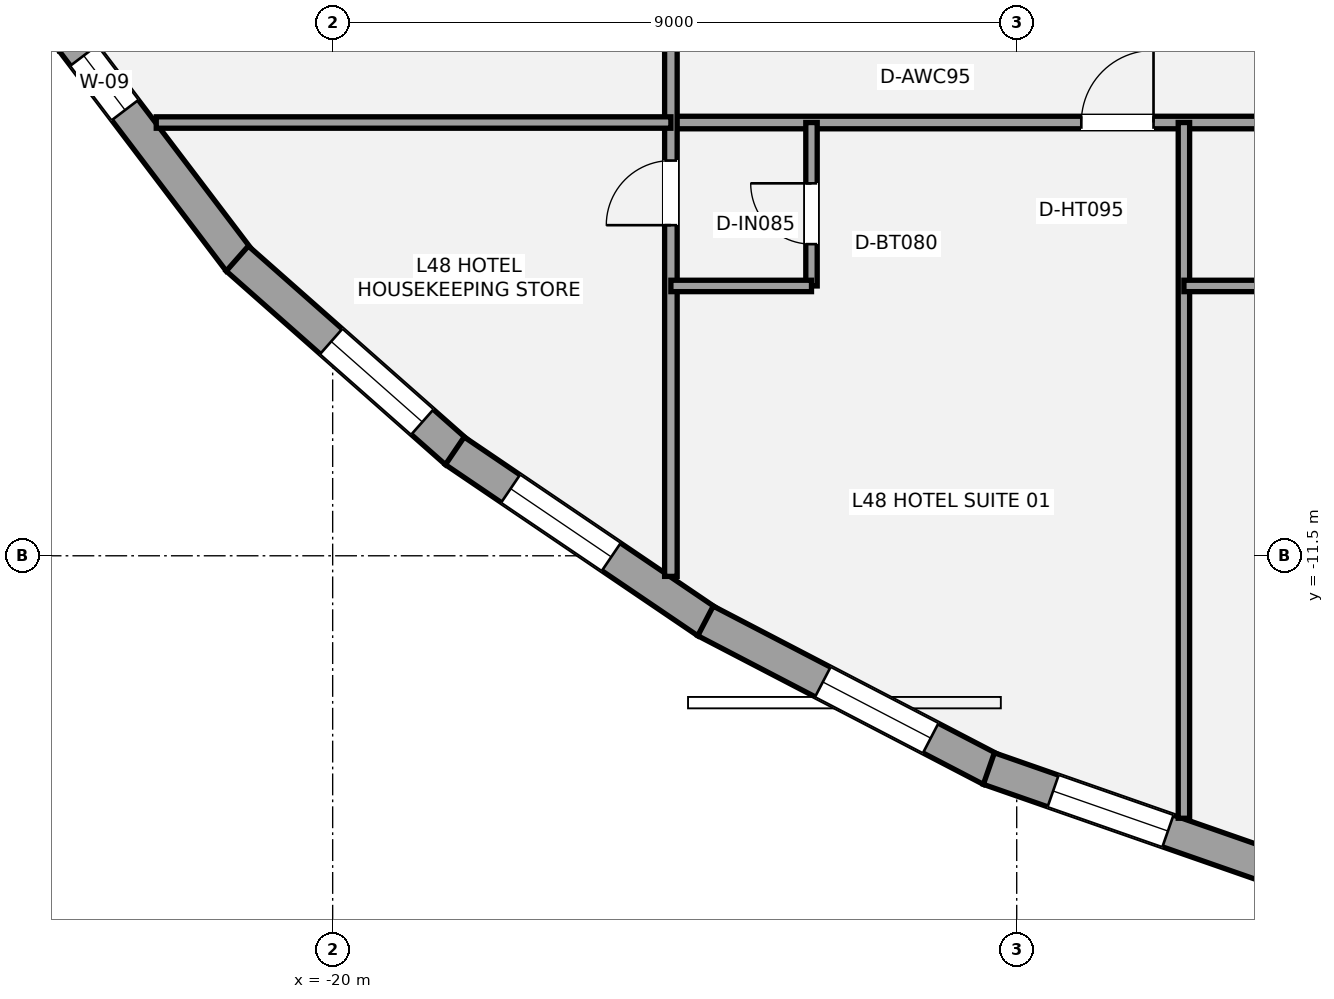
"""IFC4 building model, lengths in metres.
Left out: names, types, materials, properties, quantities, classifications, styles, units other than length and angle.
Written with IfcOpenShell. Run it as: python <this file> out.ifc"""

import sys

from ifc_helpers import new_model, si_unit, direction, frame, frame_2d, origin, place, context, subcontext, project, spatial, rectangle, extrude, element, fill, save


model = new_model("IFC4")
c1 = context("Model", 3, precision=1e-05, world=origin(), true_north=direction((0.0, 1.0)))
c2 = subcontext(c1, "Body", "Model", "MODEL_VIEW")
j1 = project(units=[si_unit("LENGTHUNIT", "METRE"), si_unit("PLANEANGLEUNIT", "RADIAN")], contexts=[c1])
p1 = place(None, origin())
s1 = spatial("IfcSite", under=j1, at=p1, CompositionType="ELEMENT")
p2 = place(p1, origin())
s2 = spatial("IfcBuilding", under=s1, at=p2, CompositionType="ELEMENT")
p3 = place(p2, frame((0.0, 0.0, 175.8)))
s3 = spatial("IfcBuildingStorey", under=s2, at=p3, CompositionType="ELEMENT", Elevation=175.8)
p4 = place(p3, frame((-21.225, -7.621, 0.0), z_axis=(0.0, 0.0, 1.0), x_axis=(-0.604517065871, 0.796592189939, 0.0)))
e1 = element("IfcWall", 1, at=p4, inside=s3, PredefinedType="STANDARD", context=c2, shape_type="SweptSolid", body=[
    extrude(rectangle(XDim=3.642, YDim=0.44, at=frame_2d((1.821, 0.0))), origin(), (0.0, 0.0, 1.0), 2.315),
])
p5 = place(p4, frame((2.492, 0.0, 0.58)))
e2 = element("IfcOpeningElement", 2, at=p5, cuts=e1, PredefinedType="OPENING", context=c2, shape_type="SweptSolid", body=[
    extrude(rectangle(XDim=0.9, YDim=1.35, at=frame_2d((0.45, 0.675))), frame((0.0, 0.23, 0.0), z_axis=(0.0, -1.0, 0.0), x_axis=(1.0, 0.0, 0.0)), (0.0, 0.0, 1.0), 0.46),
])
p6 = place(p3, frame((-18.371, -10.136, 0.0), z_axis=(0.0, 0.0, 1.0), x_axis=(-0.749530401757, 0.661969921403, 0.0)))
e3 = element("IfcWall", 3, at=p6, inside=s3, PredefinedType="STANDARD", context=c2, shape_type="SweptSolid", body=[
    extrude(rectangle(XDim=3.848, YDim=0.44, at=frame_2d((1.924, 0.0))), origin(), (0.0, 0.0, 1.0), 2.315),
])
p7 = place(p6, frame((0.6, 0.0, 0.58)))
e4 = element("IfcOpeningElement", 4, at=p7, cuts=e3, PredefinedType="OPENING", context=c2, shape_type="SweptSolid", body=[
    extrude(rectangle(XDim=1.6, YDim=1.55, at=frame_2d((0.8, 0.775))), frame((0.0, 0.23, 0.0), z_axis=(0.0, -1.0, 0.0), x_axis=(1.0, 0.0, 0.0)), (0.0, 0.0, 1.0), 0.46),
])
p8 = place(p3, frame((-15.073, -12.37, 0.0), z_axis=(0.0, 0.0, 1.0), x_axis=(-0.827746348969, 0.561102469937, 0.0)))
e5 = element("IfcWall", 5, at=p8, inside=s3, PredefinedType="STANDARD", context=c2, shape_type="SweptSolid", body=[
    extrude(rectangle(XDim=4.011, YDim=0.44, at=frame_2d((2.006, 0.0))), origin(), (0.0, 0.0, 1.0), 2.315),
])
p9 = place(p8, frame((1.524, 0.0, 0.58)))
e6 = element("IfcOpeningElement", 6, at=p9, cuts=e5, PredefinedType="OPENING", context=c2, shape_type="SweptSolid", body=[
    extrude(rectangle(XDim=1.6, YDim=1.55, at=frame_2d((0.8, 0.775))), frame((0.0, 0.23, 0.0), z_axis=(0.0, -1.0, 0.0), x_axis=(1.0, 0.0, 0.0)), (0.0, 0.0, 1.0), 0.46),
])
p10 = place(p3, frame((-11.337, -14.312, 0.0), z_axis=(0.0, 0.0, 1.0), x_axis=(-0.887117685078, 0.461543294634, 0.0)))
e7 = element("IfcWall", 7, at=p10, inside=s3, PredefinedType="STANDARD", context=c2, shape_type="SweptSolid", body=[
    extrude(rectangle(XDim=4.235, YDim=0.44, at=frame_2d((2.118, 0.0))), origin(), (0.0, 0.0, 1.0), 2.315),
])
p11 = place(p10, frame((0.896, 0.0, 0.58)))
e8 = element("IfcOpeningElement", 8, at=p11, cuts=e7, PredefinedType="OPENING", context=c2, shape_type="SweptSolid", body=[
    extrude(rectangle(XDim=1.6, YDim=1.55, at=frame_2d((0.8, 0.775))), frame((0.0, 0.23, 0.0), z_axis=(0.0, -1.0, 0.0), x_axis=(1.0, 0.0, 0.0)), (0.0, 0.0, 1.0), 0.46),
])
p12 = place(p3, frame((-7.087, -15.792, 0.0), z_axis=(0.0, 0.0, 1.0), x_axis=(-0.944223944927, 0.329304026434, 0.0)))
e9 = element("IfcWall", 9, at=p12, inside=s3, PredefinedType="STANDARD", context=c2, shape_type="SweptSolid", body=[
    extrude(rectangle(XDim=4.532, YDim=0.44, at=frame_2d((2.266, 0.0))), origin(), (0.0, 0.0, 1.0), 2.315),
])
p13 = place(p12, frame((2.037, 0.0, 0.58)))
e10 = element("IfcOpeningElement", 10, at=p13, cuts=e9, PredefinedType="OPENING", context=c2, shape_type="SweptSolid", body=[
    extrude(rectangle(XDim=1.6, YDim=1.55, at=frame_2d((0.8, 0.775))), frame((0.0, 0.23, 0.0), z_axis=(0.0, -1.0, 0.0), x_axis=(1.0, 0.0, 0.0)), (0.0, 0.0, 1.0), 0.46),
])
p14 = place(p3, frame((-15.55, -5.8, 0.0), z_axis=(0.0, 0.0, 1.0), x_axis=(1.0, 0.0, 0.0)))
e11 = element("IfcWall", 11, at=p14, inside=s3, PredefinedType="PARTITIONING", context=c2, shape_type="SweptSolid", body=[
    extrude(rectangle(XDim=31.1, YDim=0.165, at=frame_2d((15.55, 0.0))), origin(), (0.0, 0.0, 1.0), 2.398),
])
p15 = place(p14, frame((5.4, 0.0, 0.0)))
e12 = element("IfcOpeningElement", 12, at=p15, cuts=e11, PredefinedType="OPENING", context=c2, shape_type="SweptSolid", body=[
    extrude(rectangle(XDim=0.95, YDim=2.15, at=frame_2d((0.475, 1.075))), frame((0.0, 0.093, 0.0), z_axis=(0.0, -1.0, 0.0), x_axis=(1.0, 0.0, 0.0)), (0.0, 0.0, 1.0), 0.185),
])
p16 = place(p14, frame((13.2, 0.0, 0.0)))
e13 = element("IfcOpeningElement", 13, at=p16, cuts=e11, PredefinedType="OPENING", context=c2, shape_type="SweptSolid", body=[
    extrude(rectangle(XDim=0.95, YDim=2.15, at=frame_2d((0.475, 1.075))), frame((0.0, 0.093, 0.0), z_axis=(0.0, -1.0, 0.0), x_axis=(1.0, 0.0, 0.0)), (0.0, 0.0, 1.0), 0.185),
])
p17 = place(p14, frame((21.0, 0.0, 0.0)))
e14 = element("IfcOpeningElement", 14, at=p17, cuts=e11, PredefinedType="OPENING", context=c2, shape_type="SweptSolid", body=[
    extrude(rectangle(XDim=0.95, YDim=2.15, at=frame_2d((0.475, 1.075))), frame((0.0, 0.093, 0.0), z_axis=(0.0, -1.0, 0.0), x_axis=(1.0, 0.0, 0.0)), (0.0, 0.0, 1.0), 0.185),
])
p18 = place(p14, frame((29.75, 0.0, 0.0)))
e15 = element("IfcOpeningElement", 15, at=p18, cuts=e11, PredefinedType="OPENING", context=c2, shape_type="SweptSolid", body=[
    extrude(rectangle(XDim=0.95, YDim=2.15, at=frame_2d((0.475, 1.075))), frame((0.0, 0.093, 0.0), z_axis=(0.0, -1.0, 0.0), x_axis=(1.0, 0.0, 0.0)), (0.0, 0.0, 1.0), 0.185),
])
p19 = place(p3, frame((-15.55, -11.771, 0.0), z_axis=(0.0, 0.0, 1.0), x_axis=(0.0, 1.0, 0.0)))
e16 = element("IfcWall", 16, at=p19, inside=s3, PredefinedType="PARTITIONING", context=c2, shape_type="SweptSolid", body=[
    extrude(rectangle(XDim=19.321, YDim=0.165, at=frame_2d((9.661, 0.0))), origin(), (0.0, 0.0, 1.0), 2.473),
])
p20 = place(p19, frame((4.621, 0.0, 0.0)))
e17 = element("IfcOpeningElement", 17, at=p20, cuts=e16, PredefinedType="OPENING", context=c2, shape_type="SweptSolid", body=[
    extrude(rectangle(XDim=0.85, YDim=2.1, at=frame_2d((0.425, 1.05))), frame((0.0, 0.093, 0.0), z_axis=(0.0, -1.0, 0.0), x_axis=(1.0, 0.0, 0.0)), (0.0, 0.0, 1.0), 0.185),
])
p21 = place(p19, frame((7.771, 0.0, 0.0)))
e18 = element("IfcOpeningElement", 18, at=p21, cuts=e16, PredefinedType="OPENING", context=c2, shape_type="SweptSolid", body=[
    extrude(rectangle(XDim=1.0, YDim=2.15, at=frame_2d((0.5, 1.075))), frame((0.0, 0.093, 0.0), z_axis=(0.0, -1.0, 0.0), x_axis=(1.0, 0.0, 0.0)), (0.0, 0.0, 1.0), 0.185),
])
p22 = place(p19, frame((12.172, 0.0, 0.0)))
e19 = element("IfcOpeningElement", 19, at=p22, cuts=e16, PredefinedType="OPENING", context=c2, shape_type="SweptSolid", body=[
    extrude(rectangle(XDim=1.0, YDim=2.15, at=frame_2d((0.5, 1.075))), frame((0.0, 0.093, 0.0), z_axis=(0.0, -1.0, 0.0), x_axis=(1.0, 0.0, 0.0)), (0.0, 0.0, 1.0), 0.185),
])
p23 = place(p19, frame((16.547, 0.0, 0.0)))
e20 = element("IfcOpeningElement", 20, at=p23, cuts=e16, PredefinedType="OPENING", context=c2, shape_type="SweptSolid", body=[
    extrude(rectangle(XDim=1.0, YDim=2.15, at=frame_2d((0.5, 1.075))), frame((0.0, 0.093, 0.0), z_axis=(0.0, -1.0, 0.0), x_axis=(1.0, 0.0, 0.0)), (0.0, 0.0, 1.0), 0.185),
])
p24 = place(p3, frame((-22.321, -5.8, 0.0), z_axis=(0.0, 0.0, 1.0), x_axis=(1.0, 0.0, 0.0)))
e21 = element("IfcWall", 21, at=p24, inside=s3, PredefinedType="PLUMBINGWALL", context=c2, shape_type="SweptSolid", body=[
    extrude(rectangle(XDim=6.771, YDim=0.15, at=frame_2d((3.385, 0.0))), origin(), (0.0, 0.0, 1.0), 2.473),
])
p25 = place(p3, frame((-8.8, -14.953, 0.0), z_axis=(0.0, 0.0, 1.0), x_axis=(0.0, 1.0, 0.0)))
e22 = element("IfcWall", 22, at=p25, inside=s3, PredefinedType="PLUMBINGWALL", context=c2, shape_type="SweptSolid", body=[
    extrude(rectangle(XDim=9.153, YDim=0.15, at=frame_2d((4.577, 0.0))), origin(), (0.0, 0.0, 1.0), 3.02),
])
p26 = place(p3, frame((-13.7, -7.95, 0.0), z_axis=(0.0, 0.0, 1.0), x_axis=(0.0, 1.0, 0.0)))
e23 = element("IfcWall", 23, at=p26, inside=s3, PredefinedType="PLUMBINGWALL", context=c2, shape_type="SweptSolid", body=[
    extrude(rectangle(XDim=2.15, YDim=0.15, at=frame_2d((1.075, 0.0))), origin(), (0.0, 0.0, 1.0), 2.473),
])
p27 = place(p26, frame((0.55, 0.0, 0.0)))
e24 = element("IfcOpeningElement", 24, at=p27, cuts=e23, PredefinedType="OPENING", context=c2, shape_type="SweptSolid", body=[
    extrude(rectangle(XDim=0.8, YDim=2.1, at=frame_2d((0.4, 1.05))), frame((0.0, 0.085, 0.0), z_axis=(0.0, -1.0, 0.0), x_axis=(1.0, 0.0, 0.0)), (0.0, 0.0, 1.0), 0.17),
])
for number, where, z_axis, x_axis in (
    (25, (-15.55, -7.95, 0.0), (0.0, 0.0, 1.0), (1.0, 0.0, 0.0)),
    (26, (-8.8, -7.95, 0.0), (0.0, 0.0, 1.0), (1.0, 0.0, 0.0)),
):
    element("IfcWall", number, at=place(p3, frame(where, z_axis=z_axis, x_axis=x_axis)), inside=s3, PredefinedType="PLUMBINGWALL", context=c2, shape_type="SweptSolid", body=[
        extrude(rectangle(XDim=1.85, YDim=0.15, at=frame_2d((0.925, 0.0))), origin(), (0.0, 0.0, 1.0), 2.473),
    ])
p28 = place(p5, origin())
e27 = element("IfcWindow", 27, at=p28, inside=s3, PartitioningType="SINGLE_PANEL", PredefinedType="WINDOW", context=c2, shape_type="SweptSolid", body=[
    extrude(rectangle(XDim=0.9, YDim=1.35, at=frame_2d((0.45, 0.675))), frame((0.0, -0.01, 0.0), z_axis=(0.0, -1.0, 0.0), x_axis=(1.0, 0.0, 0.0)), (0.0, 0.0, 1.0), 0.06),
])
fill(e2, e27)
p29 = place(p7, origin())
e28 = element("IfcWindow", 28, at=p29, inside=s3, PartitioningType="SINGLE_PANEL", PredefinedType="WINDOW", context=c2, shape_type="SweptSolid", body=[
    extrude(rectangle(XDim=1.6, YDim=1.55, at=frame_2d((0.8, 0.775))), frame((0.0, -0.01, 0.0), z_axis=(0.0, -1.0, 0.0), x_axis=(1.0, 0.0, 0.0)), (0.0, 0.0, 1.0), 0.06),
])
fill(e4, e28)
p30 = place(p9, origin())
e29 = element("IfcWindow", 29, at=p30, inside=s3, PartitioningType="SINGLE_PANEL", PredefinedType="WINDOW", context=c2, shape_type="SweptSolid", body=[
    extrude(rectangle(XDim=1.6, YDim=1.55, at=frame_2d((0.8, 0.775))), frame((0.0, -0.01, 0.0), z_axis=(0.0, -1.0, 0.0), x_axis=(1.0, 0.0, 0.0)), (0.0, 0.0, 1.0), 0.06),
])
fill(e6, e29)
p31 = place(p11, origin())
e30 = element("IfcWindow", 30, at=p31, inside=s3, PartitioningType="SINGLE_PANEL", PredefinedType="WINDOW", context=c2, shape_type="SweptSolid", body=[
    extrude(rectangle(XDim=1.6, YDim=1.55, at=frame_2d((0.8, 0.775))), frame((0.0, -0.01, 0.0), z_axis=(0.0, -1.0, 0.0), x_axis=(1.0, 0.0, 0.0)), (0.0, 0.0, 1.0), 0.06),
])
fill(e8, e30)
p32 = place(p13, origin())
e31 = element("IfcWindow", 31, at=p32, inside=s3, PartitioningType="SINGLE_PANEL", PredefinedType="WINDOW", context=c2, shape_type="SweptSolid", body=[
    extrude(rectangle(XDim=1.6, YDim=1.55, at=frame_2d((0.8, 0.775))), frame((0.0, -0.01, 0.0), z_axis=(0.0, -1.0, 0.0), x_axis=(1.0, 0.0, 0.0)), (0.0, 0.0, 1.0), 0.06),
])
fill(e10, e31)
p33 = place(p20, origin())
e32 = element("IfcDoor", 32, at=p33, inside=s3, OperationType="SINGLE_SWING_LEFT", PredefinedType="DOOR", context=c2, shape_type="SweptSolid", body=[
    extrude(rectangle(XDim=0.85, YDim=2.1, at=frame_2d((0.425, 1.05))), frame((0.0, 0.025, 0.0), z_axis=(0.0, -1.0, 0.0), x_axis=(1.0, 0.0, 0.0)), (0.0, 0.0, 1.0), 0.05),
])
fill(e17, e32)
p34 = place(p15, origin())
e33 = element("IfcDoor", 33, at=p34, inside=s3, OperationType="SINGLE_SWING_RIGHT", PredefinedType="DOOR", context=c2, shape_type="SweptSolid", body=[
    extrude(rectangle(XDim=0.95, YDim=2.15, at=frame_2d((0.475, 1.075))), frame((0.0, 0.025, 0.0), z_axis=(0.0, -1.0, 0.0), x_axis=(1.0, 0.0, 0.0)), (0.0, 0.0, 1.0), 0.05),
])
fill(e12, e33)
p35 = place(p27, origin())
e34 = element("IfcDoor", 34, at=p35, inside=s3, OperationType="SINGLE_SWING_RIGHT", PredefinedType="DOOR", context=c2, shape_type="SweptSolid", body=[
    extrude(rectangle(XDim=0.8, YDim=2.1, at=frame_2d((0.4, 1.05))), frame((0.0, 0.025, 0.0), z_axis=(0.0, -1.0, 0.0), x_axis=(1.0, 0.0, 0.0)), (0.0, 0.0, 1.0), 0.05),
])
fill(e24, e34)
save(model, sys.argv[1])
